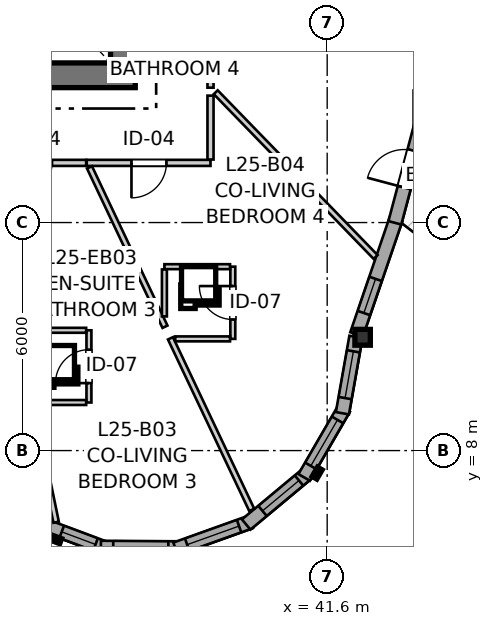
"""IFC4 building model, lengths in metres.
Left out: names, types, materials, properties, quantities, classifications, styles, units other than length and angle.
Written with IfcOpenShell. Run it as: python <this file> out.ifc"""

import sys

from ifc_helpers import new_model, si_unit, direction, frame, frame_2d, origin, origin_2d, place, context, subcontext, project, spatial, rectangle, i_section, extrude, source, transform, mapped, element, fill, save


model = new_model("IFC4")
c1 = context("Model", 3, precision=1e-05, world=origin(), true_north=direction((0.0, 1.0)))
c2 = subcontext(c1, "Body", "Model", "MODEL_VIEW")
j1 = project(units=[si_unit("LENGTHUNIT", "METRE"), si_unit("PLANEANGLEUNIT", "RADIAN")], contexts=[c1])
p1 = place(None, origin())
s1 = spatial("IfcSite", under=j1, at=p1, CompositionType="ELEMENT")
p2 = place(p1, origin())
s2 = spatial("IfcBuilding", under=s1, at=p2, CompositionType="ELEMENT")
p3 = place(p2, frame((0.0, 0.0, 86.4)))
s3 = spatial("IfcBuildingStorey", under=s2, at=p3, CompositionType="ELEMENT", Elevation=86.4)
p4 = place(p3, frame((24.15, 17.875, 0.0), z_axis=(0.0, 0.0, 1.0), x_axis=(1.0, 0.0, 0.0)))
e1 = element("IfcWall", 1, at=p4, inside=s3, PredefinedType="SHEAR", context=c2, shape_type="SweptSolid", body=[
    extrude(rectangle(XDim=12.4, YDim=0.65, at=frame_2d((6.2, 0.0))), origin(), (0.0, 0.0, 1.0), 2.95),
])
p5 = place(p3, frame((36.225, 18.2, 0.0), z_axis=(0.0, 0.0, 1.0), x_axis=(0.0, 1.0, 0.0)))
e2 = element("IfcWall", 2, at=p5, inside=s3, PredefinedType="SHEAR", context=c2, shape_type="SweptSolid", body=[
    extrude(rectangle(XDim=15.6, YDim=0.65, at=frame_2d((7.8, 0.0))), origin(), (0.0, 0.0, 1.0), 2.95),
])
p6 = place(p5, frame((4.25, 0.0, 0.0)))
e3 = element("IfcOpeningElement", 3, at=p6, cuts=e2, PredefinedType="OPENING", context=c2, shape_type="SweptSolid", body=[
    extrude(rectangle(XDim=1.1, YDim=2.15, at=frame_2d((0.55, 1.075))), frame((0.0, 0.335, 0.0), z_axis=(0.0, -1.0, 0.0), x_axis=(1.0, 0.0, 0.0)), (0.0, 0.0, 1.0), 0.67),
])
p7 = place(p5, frame((10.25, 0.0, 0.0)))
e4 = element("IfcOpeningElement", 4, at=p7, cuts=e2, PredefinedType="OPENING", context=c2, shape_type="SweptSolid", body=[
    extrude(rectangle(XDim=1.1, YDim=2.15, at=frame_2d((0.55, 1.075))), frame((0.0, 0.335, 0.0), z_axis=(0.0, -1.0, 0.0), x_axis=(1.0, 0.0, 0.0)), (0.0, 0.0, 1.0), 0.67),
])
m1 = source(origin(), c2, "Body", "SweptSolid", [
    extrude(i_section(OverallWidth=0.406, OverallDepth=0.416, WebThickness=0.027, FlangeThickness=0.044, FilletRadius=0.015, at=origin_2d()), origin(), (0.0, 0.0, 1.0), 2.95),
])
p8 = place(p3, frame((42.532, 10.981, 0.0), z_axis=(0.0, 0.0, 1.0), x_axis=(1.0, 0.0, 0.0)))
e5 = element("IfcColumn", 5, at=p8, inside=s3, PredefinedType="PILASTER", context=c2, shape_type="MappedRepresentation", body=[
    mapped(m1, transform((0.0, 0.0, 0.0), x_axis=(1.0, 0.0, 0.0), y_axis=(0.0, 1.0, 0.0), z_axis=(0.0, 0.0, 1.0), scale=1.0)),
])
p9 = place(p3, frame((34.059, 6.07, 0.0), z_axis=(0.0, 0.0, 1.0), x_axis=(0.936803747811, -0.349855310219, 0.0)))
e6 = element("IfcWall", 6, at=p9, inside=s3, PredefinedType="SOLIDWALL", context=c2, shape_type="SweptSolid", body=[
    extrude(rectangle(XDim=1.836, YDim=0.35, at=frame_2d((0.918, 0.0))), origin(), (0.0, 0.0, 1.0), 2.48),
])
p10 = place(p9, frame((0.593, 0.0, 0.82)))
e7 = element("IfcOpeningElement", 7, at=p10, cuts=e6, PredefinedType="OPENING", context=c2, shape_type="SweptSolid", body=[
    extrude(rectangle(XDim=0.95, YDim=1.35, at=frame_2d((0.475, 0.675))), frame((0.0, 0.185, 0.0), z_axis=(0.0, -1.0, 0.0), x_axis=(1.0, 0.0, 0.0)), (0.0, 0.0, 1.0), 0.37),
])
p11 = place(p3, frame((35.646, 5.452, 0.0), z_axis=(0.0, 0.0, 1.0), x_axis=(0.999976451414, -0.006862697526, 0.0)))
e8 = element("IfcWall", 8, at=p11, inside=s3, PredefinedType="SOLIDWALL", context=c2, shape_type="SweptSolid", body=[
    extrude(rectangle(XDim=2.099, YDim=0.35, at=frame_2d((1.049, 0.0))), origin(), (0.0, 0.0, 1.0), 2.48),
])
p12 = place(p11, frame((0.324, 0.0, 0.82)))
e9 = element("IfcOpeningElement", 9, at=p12, cuts=e8, PredefinedType="OPENING", context=c2, shape_type="SweptSolid", body=[
    extrude(rectangle(XDim=1.45, YDim=1.25, at=frame_2d((0.725, 0.625))), frame((0.0, 0.185, 0.0), z_axis=(0.0, -1.0, 0.0), x_axis=(1.0, 0.0, 0.0)), (0.0, 0.0, 1.0), 0.37),
])
p13 = place(p3, frame((37.61, 5.415, 0.0), z_axis=(0.0, 0.0, 1.0), x_axis=(0.941473186867, 0.33708787936, 0.0)))
e10 = element("IfcWall", 10, at=p13, inside=s3, PredefinedType="SOLIDWALL", context=c2, shape_type="SweptSolid", body=[
    extrude(rectangle(XDim=2.099, YDim=0.35, at=frame_2d((1.049, 0.0))), origin(), (0.0, 0.0, 1.0), 2.48),
])
p14 = place(p13, frame((0.324, 0.0, 0.82)))
e11 = element("IfcOpeningElement", 11, at=p14, cuts=e10, PredefinedType="OPENING", context=c2, shape_type="SweptSolid", body=[
    extrude(rectangle(XDim=1.45, YDim=1.25, at=frame_2d((0.725, 0.625))), frame((0.0, 0.185, 0.0), z_axis=(0.0, -1.0, 0.0), x_axis=(1.0, 0.0, 0.0)), (0.0, 0.0, 1.0), 0.37),
])
p15 = place(p3, frame((39.469, 6.055, 0.0), z_axis=(0.0, 0.0, 1.0), x_axis=(0.768497696041, 0.639852554249, 0.0)))
e12 = element("IfcWall", 12, at=p15, inside=s3, PredefinedType="SOLIDWALL", context=c2, shape_type="SweptSolid", body=[
    extrude(rectangle(XDim=2.099, YDim=0.35, at=frame_2d((1.049, 0.0))), origin(), (0.0, 0.0, 1.0), 2.48),
])
p16 = place(p15, frame((0.559, 0.0, 0.82)))
e13 = element("IfcOpeningElement", 13, at=p16, cuts=e12, PredefinedType="OPENING", context=c2, shape_type="SweptSolid", body=[
    extrude(rectangle(XDim=1.25, YDim=1.35, at=frame_2d((0.625, 0.675))), frame((0.0, 0.185, 0.0), z_axis=(0.0, -1.0, 0.0), x_axis=(1.0, 0.0, 0.0)), (0.0, 0.0, 1.0), 0.37),
])
p17 = place(p3, frame((40.994, 7.294, 0.0), z_axis=(0.0, 0.0, 1.0), x_axis=(0.501902596059, 0.864924149315, 0.0)))
e14 = element("IfcWall", 14, at=p17, inside=s3, PredefinedType="SOLIDWALL", context=c2, shape_type="SweptSolid", body=[
    extrude(rectangle(XDim=2.099, YDim=0.35, at=frame_2d((1.049, 0.0))), origin(), (0.0, 0.0, 1.0), 2.48),
])
p18 = place(p17, frame((0.35, 0.0, 0.82)))
e15 = element("IfcOpeningElement", 15, at=p18, cuts=e14, PredefinedType="OPENING", context=c2, shape_type="SweptSolid", body=[
    extrude(rectangle(XDim=1.4, YDim=1.35, at=frame_2d((0.7, 0.675))), frame((0.0, 0.185, 0.0), z_axis=(0.0, -1.0, 0.0), x_axis=(1.0, 0.0, 0.0)), (0.0, 0.0, 1.0), 0.37),
])
p19 = place(p3, frame((42.001, 8.982, 0.0), z_axis=(0.0, 0.0, 1.0), x_axis=(0.174419977077, 0.984671352075, 0.0)))
e16 = element("IfcWall", 16, at=p19, inside=s3, PredefinedType="SOLIDWALL", context=c2, shape_type="SweptSolid", body=[
    extrude(rectangle(XDim=2.041, YDim=0.35, at=frame_2d((1.021, 0.0))), origin(), (0.0, 0.0, 1.0), 2.48),
])
p20 = place(p19, frame((0.406, 0.0, 0.82)))
e17 = element("IfcOpeningElement", 17, at=p20, cuts=e16, PredefinedType="OPENING", context=c2, shape_type="SweptSolid", body=[
    extrude(rectangle(XDim=1.25, YDim=1.35, at=frame_2d((0.625, 0.675))), frame((0.0, 0.185, 0.0), z_axis=(0.0, -1.0, 0.0), x_axis=(1.0, 0.0, 0.0)), (0.0, 0.0, 1.0), 0.37),
])
p21 = place(p3, frame((42.373, 11.057, 0.0), z_axis=(0.0, 0.0, 1.0), x_axis=(0.323628226775, 0.946184321808, 0.0)))
e18 = element("IfcWall", 18, at=p21, inside=s3, PredefinedType="SOLIDWALL", context=c2, shape_type="SweptSolid", body=[
    extrude(rectangle(XDim=3.193, YDim=0.35, at=frame_2d((1.596, 0.0))), origin(), (0.0, 0.0, 1.0), 2.48),
])
p22 = place(p21, frame((0.595, 0.0, 0.82)))
e19 = element("IfcOpeningElement", 19, at=p22, cuts=e18, PredefinedType="OPENING", context=c2, shape_type="SweptSolid", body=[
    extrude(rectangle(XDim=0.95, YDim=1.35, at=frame_2d((0.475, 0.675))), frame((0.0, 0.185, 0.0), z_axis=(0.0, -1.0, 0.0), x_axis=(1.0, 0.0, 0.0)), (0.0, 0.0, 1.0), 0.37),
])
p23 = place(p3, frame((43.381, 13.993, 0.0), z_axis=(0.0, 0.0, 1.0), x_axis=(0.257079998736, 0.966390125286, 0.0)))
e20 = element("IfcWall", 20, at=p23, inside=s3, PredefinedType="SOLIDWALL", context=c2, shape_type="SweptSolid", body=[
    extrude(rectangle(XDim=2.921, YDim=0.35, at=frame_2d((1.46, 0.0))), origin(), (0.0, 0.0, 1.0), 2.48),
])
p24 = place(p23, frame((0.961, 0.0, 0.0)))
e21 = element("IfcOpeningElement", 21, at=p24, cuts=e20, PredefinedType="OPENING", context=c2, shape_type="SweptSolid", body=[
    extrude(rectangle(XDim=1.0, YDim=2.1, at=frame_2d((0.5, 1.05))), frame((0.0, 0.185, 0.0), z_axis=(0.0, -1.0, 0.0), x_axis=(1.0, 0.0, 0.0)), (0.0, 0.0, 1.0), 0.37),
])
p25 = place(p3, frame((38.53, 23.392, 0.0), z_axis=(0.0, 0.0, 1.0), x_axis=(0.0, -1.0, 0.0)))
e22 = element("IfcWall", 22, at=p25, inside=s3, PredefinedType="PARTITIONING", context=c2, shape_type="SweptSolid", body=[
    extrude(rectangle(XDim=5.843, YDim=0.16, at=frame_2d((2.921, 0.0))), origin(), (0.0, 0.0, 1.0), 2.95),
])
p26 = place(p25, frame((2.438, 0.0, 0.0)))
e23 = element("IfcOpeningElement", 23, at=p26, cuts=e22, PredefinedType="OPENING", context=c2, shape_type="SweptSolid", body=[
    extrude(rectangle(XDim=0.96, YDim=2.1, at=frame_2d((0.48, 1.05))), frame((0.0, 0.09, 0.0), z_axis=(0.0, -1.0, 0.0), x_axis=(1.0, 0.0, 0.0)), (0.0, 0.0, 1.0), 0.18),
])
p27 = place(p3, frame((38.53, 15.57, 0.0), z_axis=(0.0, 0.0, 1.0), x_axis=(-1.0, 0.0, 0.0)))
e24 = element("IfcWall", 24, at=p27, inside=s3, PredefinedType="PARTITIONING", context=c2, shape_type="SweptSolid", body=[
    extrude(rectangle(XDim=3.257, YDim=0.16, at=frame_2d((1.628, 0.0))), origin(), (0.0, 0.0, 1.0), 2.95),
])
p28 = place(p27, frame((1.16, 0.0, 0.0)))
e25 = element("IfcOpeningElement", 25, at=p28, cuts=e24, PredefinedType="OPENING", context=c2, shape_type="SweptSolid", body=[
    extrude(rectangle(XDim=0.92, YDim=2.1, at=frame_2d((0.46, 1.05))), frame((0.0, 0.09, 0.0), z_axis=(0.0, -1.0, 0.0), x_axis=(1.0, 0.0, 0.0)), (0.0, 0.0, 1.0), 0.18),
])
p29 = place(p3, frame((35.258, 15.57, 0.0), z_axis=(0.0, 0.0, 1.0), x_axis=(-1.0, 0.0, 0.0)))
e26 = element("IfcWall", 26, at=p29, inside=s3, PredefinedType="PARTITIONING", context=c2, shape_type="SweptSolid", body=[
    extrude(rectangle(XDim=2.718, YDim=0.16, at=frame_2d((1.359, 0.0))), origin(), (0.0, 0.0, 1.0), 2.95),
])
p30 = place(p29, frame((0.898, 0.0, 0.0)))
e27 = element("IfcOpeningElement", 27, at=p30, cuts=e26, PredefinedType="OPENING", context=c2, shape_type="SweptSolid", body=[
    extrude(rectangle(XDim=0.92, YDim=2.1, at=frame_2d((0.46, 1.05))), frame((0.0, 0.09, 0.0), z_axis=(0.0, -1.0, 0.0), x_axis=(1.0, 0.0, 0.0)), (0.0, 0.0, 1.0), 0.18),
])
p31 = place(p3, frame((39.117, 10.939, 0.0), z_axis=(0.0, 0.0, 1.0), x_axis=(0.0, 1.0, 0.0)))
e28 = element("IfcWall", 28, at=p31, inside=s3, PredefinedType="PARTITIONING", context=c2, shape_type="SweptSolid", body=[
    extrude(rectangle(XDim=1.9, YDim=0.13, at=frame_2d((0.95, 0.0))), origin(), (0.0, 0.0, 1.0), 2.95),
])
p32 = place(p31, frame((0.51, 0.0, 0.0)))
e29 = element("IfcOpeningElement", 29, at=p32, cuts=e28, PredefinedType="OPENING", context=c2, shape_type="SweptSolid", body=[
    extrude(rectangle(XDim=0.88, YDim=2.05, at=frame_2d((0.44, 1.025))), frame((0.0, 0.075, 0.0), z_axis=(0.0, -1.0, 0.0), x_axis=(1.0, 0.0, 0.0)), (0.0, 0.0, 1.0), 0.15),
])
p33 = place(p3, frame((35.331, 9.265, 0.0), z_axis=(0.0, 0.0, 1.0), x_axis=(0.0, 1.0, 0.0)))
e30 = element("IfcWall", 30, at=p33, inside=s3, PredefinedType="PARTITIONING", context=c2, shape_type="SweptSolid", body=[
    extrude(rectangle(XDim=1.9, YDim=0.13, at=frame_2d((0.95, 0.0))), origin(), (0.0, 0.0, 1.0), 2.95),
])
p34 = place(p33, frame((0.51, 0.0, 0.0)))
e31 = element("IfcOpeningElement", 31, at=p34, cuts=e30, PredefinedType="OPENING", context=c2, shape_type="SweptSolid", body=[
    extrude(rectangle(XDim=0.88, YDim=2.05, at=frame_2d((0.44, 1.025))), frame((0.0, 0.075, 0.0), z_axis=(0.0, -1.0, 0.0), x_axis=(1.0, 0.0, 0.0)), (0.0, 0.0, 1.0), 0.15),
])
p35 = place(p3, frame((38.667, 17.429, 0.0), z_axis=(0.0, 0.0, 1.0), x_axis=(0.696417222112, -0.717637131666, 0.0)))
e32 = element("IfcWall", 32, at=p35, inside=s3, PredefinedType="PARTITIONING", context=c2, shape_type="SweptSolid", body=[
    extrude(rectangle(XDim=6.04, YDim=0.145, at=frame_2d((3.02, 0.0))), origin(), (0.0, 0.0, 1.0), 2.95),
])
p36 = place(p3, frame((37.476, 10.954, 0.0), z_axis=(0.0, 0.0, 1.0), x_axis=(0.428094746621, -0.903733859007, 0.0)))
e33 = element("IfcWall", 33, at=p36, inside=s3, PredefinedType="PARTITIONING", context=c2, shape_type="SweptSolid", body=[
    extrude(rectangle(XDim=4.996, YDim=0.145, at=frame_2d((2.498, 0.0))), origin(), (0.0, 0.0, 1.0), 2.95),
])
p37 = place(p3, frame((35.346, 15.452, 0.0), z_axis=(0.0, 0.0, 1.0), x_axis=(0.428023015228, -0.903767834366, 0.0)))
e34 = element("IfcWall", 34, at=p37, inside=s3, PredefinedType="PARTITIONING", context=c2, shape_type="SweptSolid", body=[
    extrude(rectangle(XDim=4.64, YDim=0.145, at=frame_2d((2.32, 0.0))), origin(), (0.0, 0.0, 1.0), 2.95),
])
p38 = place(p3, frame((33.813, 9.28, 0.0), z_axis=(0.0, 0.0, 1.0), x_axis=(0.202648062782, -0.979251633979, 0.0)))
e35 = element("IfcWall", 35, at=p38, inside=s3, PredefinedType="PARTITIONING", context=c2, shape_type="SweptSolid", body=[
    extrude(rectangle(XDim=3.232, YDim=0.145, at=frame_2d((1.616, 0.0))), origin(), (0.0, 0.0, 1.0), 2.95),
])
p39 = place(p3, frame((38.53, 15.658, 0.0), z_axis=(0.0, 0.0, 1.0), x_axis=(0.0, 1.0, 0.0)))
e36 = element("IfcWall", 36, at=p39, inside=s3, PredefinedType="PARTITIONING", context=c2, shape_type="SweptSolid", body=[
    extrude(rectangle(XDim=1.682, YDim=0.16, at=frame_2d((0.841, 0.0))), origin(), (0.0, 0.0, 1.0), 2.95),
])
p40 = place(p3, frame((33.626, 11.165, 0.0), z_axis=(0.0, 0.0, 1.0), x_axis=(1.0, 0.0, 0.0)))
e37 = element("IfcWall", 37, at=p40, inside=s3, PredefinedType="PARTITIONING", context=c2, shape_type="SweptSolid", body=[
    extrude(rectangle(XDim=1.632, YDim=0.13, at=frame_2d((0.816, 0.0))), origin(), (0.0, 0.0, 1.0), 2.95),
])
p41 = place(p3, frame((37.317, 12.839, 0.0), z_axis=(0.0, 0.0, 1.0), x_axis=(1.0, 0.0, 0.0)))
e38 = element("IfcWall", 38, at=p41, inside=s3, PredefinedType="PARTITIONING", context=c2, shape_type="SweptSolid", body=[
    extrude(rectangle(XDim=1.727, YDim=0.13, at=frame_2d((0.864, 0.0))), origin(), (0.0, 0.0, 1.0), 2.95),
])
p42 = place(p3, frame((37.602, 10.939, 0.0), z_axis=(0.0, 0.0, 1.0), x_axis=(1.0, 0.0, 0.0)))
e39 = element("IfcWall", 39, at=p42, inside=s3, PredefinedType="PARTITIONING", context=c2, shape_type="SweptSolid", body=[
    extrude(rectangle(XDim=1.442, YDim=0.13, at=frame_2d((0.721, 0.0))), origin(), (0.0, 0.0, 1.0), 2.95),
])
p43 = place(p3, frame((37.317, 11.53, 0.0), z_axis=(0.0, 0.0, 1.0), x_axis=(0.0, 1.0, 0.0)))
e40 = element("IfcWall", 40, at=p43, inside=s3, PredefinedType="PARTITIONING", context=c2, shape_type="SweptSolid", body=[
    extrude(rectangle(XDim=1.236, YDim=0.13, at=frame_2d((0.618, 0.0))), origin(), (0.0, 0.0, 1.0), 2.95),
])
p44 = place(p3, frame((33.912, 9.265, 0.0), z_axis=(0.0, 0.0, 1.0), x_axis=(1.0, 0.0, 0.0)))
e41 = element("IfcWall", 41, at=p44, inside=s3, PredefinedType="PARTITIONING", context=c2, shape_type="SweptSolid", body=[
    extrude(rectangle(XDim=1.346, YDim=0.13, at=frame_2d((0.673, 0.0))), origin(), (0.0, 0.0, 1.0), 2.95),
])
m2 = source(origin(), c2, "Body", "SweptSolid", [
    extrude(rectangle(XDim=0.95, YDim=1.35, at=frame_2d((0.475, 0.675))), frame((0.0, 0.03, 0.0), z_axis=(0.0, -1.0, 0.0), x_axis=(1.0, 0.0, 0.0)), (0.0, 0.0, 1.0), 0.06),
])
p45 = place(p10, origin())
e42 = element("IfcWindow", 42, at=p45, inside=s3, PartitioningType="SINGLE_PANEL", PredefinedType="WINDOW", context=c2, shape_type="MappedRepresentation", body=[
    mapped(m2, transform((0.0, 0.0, 0.0), x_axis=(1.0, 0.0, 0.0), y_axis=(0.0, 1.0, 0.0), z_axis=(0.0, 0.0, 1.0), scale=1.0)),
])
fill(e7, e42)
m3 = source(origin(), c2, "Body", "SweptSolid", [
    extrude(rectangle(XDim=1.45, YDim=1.25, at=frame_2d((0.725, 0.625))), frame((0.0, 0.03, 0.0), z_axis=(0.0, -1.0, 0.0), x_axis=(1.0, 0.0, 0.0)), (0.0, 0.0, 1.0), 0.06),
])
p46 = place(p12, origin())
e43 = element("IfcWindow", 43, at=p46, inside=s3, PartitioningType="SINGLE_PANEL", PredefinedType="WINDOW", context=c2, shape_type="MappedRepresentation", body=[
    mapped(m3, transform((0.0, 0.0, 0.0), x_axis=(1.0, 0.0, 0.0), y_axis=(0.0, 1.0, 0.0), z_axis=(0.0, 0.0, 1.0), scale=1.0)),
])
fill(e9, e43)
p47 = place(p14, origin())
e44 = element("IfcWindow", 44, at=p47, inside=s3, PartitioningType="SINGLE_PANEL", PredefinedType="WINDOW", context=c2, shape_type="MappedRepresentation", body=[
    mapped(m3, transform((0.0, 0.0, 0.0), x_axis=(1.0, 0.0, 0.0), y_axis=(0.0, 1.0, 0.0), z_axis=(0.0, 0.0, 1.0), scale=1.0)),
])
fill(e11, e44)
m4 = source(origin(), c2, "Body", "SweptSolid", [
    extrude(rectangle(XDim=1.25, YDim=1.35, at=frame_2d((0.625, 0.675))), frame((0.0, 0.03, 0.0), z_axis=(0.0, -1.0, 0.0), x_axis=(1.0, 0.0, 0.0)), (0.0, 0.0, 1.0), 0.06),
])
p48 = place(p16, origin())
e45 = element("IfcWindow", 45, at=p48, inside=s3, PartitioningType="SINGLE_PANEL", PredefinedType="WINDOW", context=c2, shape_type="MappedRepresentation", body=[
    mapped(m4, transform((0.0, 0.0, 0.0), x_axis=(1.0, 0.0, 0.0), y_axis=(0.0, 1.0, 0.0), z_axis=(0.0, 0.0, 1.0), scale=1.0)),
])
fill(e13, e45)
m5 = source(origin(), c2, "Body", "SweptSolid", [
    extrude(rectangle(XDim=1.4, YDim=1.35, at=frame_2d((0.7, 0.675))), frame((0.0, 0.03, 0.0), z_axis=(0.0, -1.0, 0.0), x_axis=(1.0, 0.0, 0.0)), (0.0, 0.0, 1.0), 0.06),
])
p49 = place(p18, origin())
e46 = element("IfcWindow", 46, at=p49, inside=s3, PartitioningType="SINGLE_PANEL", PredefinedType="WINDOW", context=c2, shape_type="MappedRepresentation", body=[
    mapped(m5, transform((0.0, 0.0, 0.0), x_axis=(1.0, 0.0, 0.0), y_axis=(0.0, 1.0, 0.0), z_axis=(0.0, 0.0, 1.0), scale=1.0)),
])
fill(e15, e46)
p50 = place(p20, origin())
e47 = element("IfcWindow", 47, at=p50, inside=s3, PartitioningType="SINGLE_PANEL", PredefinedType="WINDOW", context=c2, shape_type="MappedRepresentation", body=[
    mapped(m4, transform((0.0, 0.0, 0.0), x_axis=(1.0, 0.0, 0.0), y_axis=(0.0, 1.0, 0.0), z_axis=(0.0, 0.0, 1.0), scale=1.0)),
])
fill(e17, e47)
p51 = place(p22, origin())
e48 = element("IfcWindow", 48, at=p51, inside=s3, PartitioningType="SINGLE_PANEL", PredefinedType="WINDOW", context=c2, shape_type="MappedRepresentation", body=[
    mapped(m2, transform((0.0, 0.0, 0.0), x_axis=(1.0, 0.0, 0.0), y_axis=(0.0, 1.0, 0.0), z_axis=(0.0, 0.0, 1.0), scale=1.0)),
])
fill(e19, e48)
m6 = source(origin(), c2, "Body", "SweptSolid", [
    extrude(rectangle(XDim=1.0, YDim=2.1, at=frame_2d((0.5, 1.05))), frame((0.0, 0.025, 0.0), z_axis=(0.0, -1.0, 0.0), x_axis=(1.0, 0.0, 0.0)), (0.0, 0.0, 1.0), 0.05),
])
p52 = place(p24, origin())
e49 = element("IfcDoor", 49, at=p52, inside=s3, OperationType="SINGLE_SWING_LEFT", PredefinedType="DOOR", context=c2, shape_type="MappedRepresentation", body=[
    mapped(m6, transform((0.0, 0.0, 0.0), x_axis=(1.0, 0.0, 0.0), y_axis=(0.0, 1.0, 0.0), z_axis=(0.0, 0.0, 1.0), scale=1.0)),
])
fill(e21, e49)
m7 = source(origin(), c2, "Body", "SweptSolid", [
    extrude(rectangle(XDim=0.92, YDim=2.1, at=frame_2d((0.46, 1.05))), frame((0.0, 0.025, 0.0), z_axis=(0.0, -1.0, 0.0), x_axis=(1.0, 0.0, 0.0)), (0.0, 0.0, 1.0), 0.05),
])
p53 = place(p28, origin())
e50 = element("IfcDoor", 50, at=p53, inside=s3, OperationType="SINGLE_SWING_RIGHT", PredefinedType="DOOR", context=c2, shape_type="MappedRepresentation", body=[
    mapped(m7, transform((0.0, 0.0, 0.0), x_axis=(1.0, 0.0, 0.0), y_axis=(0.0, 1.0, 0.0), z_axis=(0.0, 0.0, 1.0), scale=1.0)),
])
fill(e25, e50)
p54 = place(p30, origin())
e51 = element("IfcDoor", 51, at=p54, inside=s3, OperationType="SINGLE_SWING_RIGHT", PredefinedType="DOOR", context=c2, shape_type="MappedRepresentation", body=[
    mapped(m7, transform((0.0, 0.0, 0.0), x_axis=(1.0, 0.0, 0.0), y_axis=(0.0, 1.0, 0.0), z_axis=(0.0, 0.0, 1.0), scale=1.0)),
])
fill(e27, e51)
m8 = source(origin(), c2, "Body", "SweptSolid", [
    extrude(rectangle(XDim=0.88, YDim=2.05, at=frame_2d((0.44, 1.025))), frame((0.0, 0.025, 0.0), z_axis=(0.0, -1.0, 0.0), x_axis=(1.0, 0.0, 0.0)), (0.0, 0.0, 1.0), 0.05),
])
p55 = place(p32, origin())
e52 = element("IfcDoor", 52, at=p55, inside=s3, OperationType="SINGLE_SWING_RIGHT", PredefinedType="DOOR", context=c2, shape_type="MappedRepresentation", body=[
    mapped(m8, transform((0.0, 0.0, 0.0), x_axis=(1.0, 0.0, 0.0), y_axis=(0.0, 1.0, 0.0), z_axis=(0.0, 0.0, 1.0), scale=1.0)),
])
fill(e29, e52)
p56 = place(p34, origin())
e53 = element("IfcDoor", 53, at=p56, inside=s3, OperationType="SINGLE_SWING_LEFT", PredefinedType="DOOR", context=c2, shape_type="MappedRepresentation", body=[
    mapped(m8, transform((0.0, 0.0, 0.0), x_axis=(1.0, 0.0, 0.0), y_axis=(0.0, 1.0, 0.0), z_axis=(0.0, 0.0, 1.0), scale=1.0)),
])
fill(e31, e53)
save(model, sys.argv[1])
